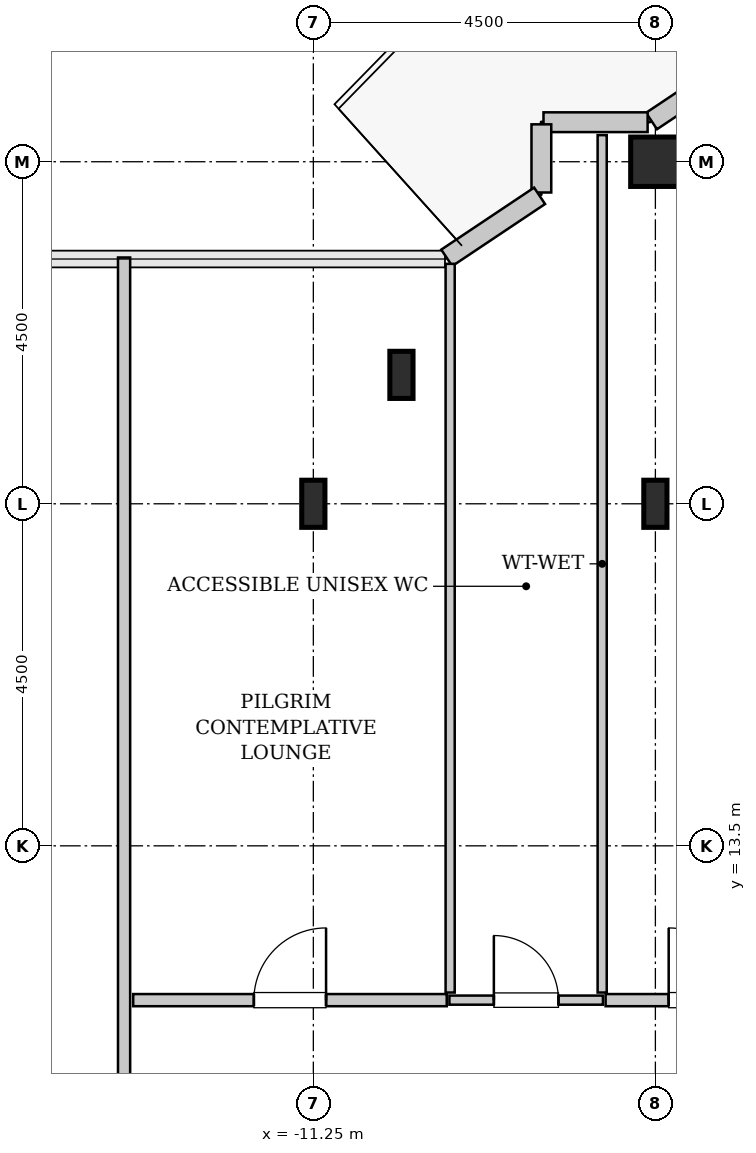
"""IFC4 building model, lengths in metres.
Left out: names, types, materials, properties, quantities, classifications, styles, units other than length and angle.
Written with IfcOpenShell. Run it as: python <this file> out.ifc"""

import sys

from ifc_helpers import new_model, si_unit, direction, frame, frame_2d, origin, origin_2d, place, context, subcontext, project, spatial, rectangle, hollow_rectangle, i_section, extrude, source, transform, mapped, element, fill, save


model = new_model("IFC4")
c1 = context("Model", 3, precision=1e-05, world=origin(), true_north=direction((0.0, 1.0)))
c2 = subcontext(c1, "Body", "Model", "MODEL_VIEW")
j1 = project(units=[si_unit("LENGTHUNIT", "METRE"), si_unit("PLANEANGLEUNIT", "RADIAN")], contexts=[c1])
p1 = place(None, origin())
s1 = spatial("IfcSite", under=j1, at=p1, CompositionType="ELEMENT")
p2 = place(p1, origin())
s2 = spatial("IfcBuilding", under=s1, at=p2, CompositionType="ELEMENT")
p3 = place(p2, frame((0.0, 0.0, 279.8)))
s3 = spatial("IfcBuildingStorey", under=s2, at=p3, CompositionType="ELEMENT", Elevation=279.8)
m1 = source(origin(), c2, "Body", "SweptSolid", [
    extrude(i_section(OverallWidth=0.305, OverallDepth=0.62, WebThickness=0.021, FlangeThickness=0.04, FilletRadius=0.027, at=origin_2d()), origin(), (0.0, 0.0, 1.0), 3.8),
])
for number, where, z_axis, x_axis in (
    (1, (-11.25, 18.0, 0.0), (0.0, 0.0, 1.0), (1.0, 0.0, 0.0)),
    (2, (-10.091, 19.696, 0.0), (0.0, 0.0, 1.0), (1.0, 0.0, 0.0)),
    (3, (-6.75, 18.0, 0.0), (0.0, 0.0, 1.0), (1.0, 0.0, 0.0)),
):
    element("IfcColumn", number, at=place(p3, frame(where, z_axis=z_axis, x_axis=x_axis)), inside=s3, PredefinedType="COLUMN", context=c2, shape_type="MappedRepresentation", body=[
        mapped(m1, transform((0.0, 0.0, 0.0), x_axis=(1.0, 0.0, 0.0), y_axis=(0.0, 1.0, 0.0), z_axis=(0.0, 0.0, 1.0), scale=1.0)),
    ])
m2 = source(origin(), c2, "Body", "SweptSolid", [
    extrude(hollow_rectangle(XDim=0.65, YDim=0.65, WallThickness=0.032, InnerFilletRadius=0.032, OuterFilletRadius=0.064, at=origin_2d()), origin(), (0.0, 0.0, 1.0), 3.8),
])
p4 = place(p3, frame((-6.75, 22.5, 0.0), z_axis=(0.0, 0.0, 1.0), x_axis=(1.0, 0.0, 0.0)))
e4 = element("IfcColumn", 4, at=p4, inside=s3, PredefinedType="COLUMN", context=c2, shape_type="MappedRepresentation", body=[
    mapped(m2, transform((0.0, 0.0, 0.0), x_axis=(1.0, 0.0, 0.0), y_axis=(0.0, 1.0, 0.0), z_axis=(0.0, 0.0, 1.0), scale=1.0)),
])
m3 = source(origin(), c2, "Body", "SweptSolid", [
    extrude(rectangle(XDim=0.565, YDim=0.26, at=frame_2d((0.283, 0.0))), origin(), (0.0, 0.0, 1.0), 3.55),
])
p5 = place(p3, frame((-6.331, 23.35, 0.0), z_axis=(0.0, 0.0, 1.0), x_axis=(-0.831651492666, -0.555297933317, 0.0)))
e5 = element("IfcWall", 5, at=p5, inside=s3, PredefinedType="SOLIDWALL", context=c2, shape_type="MappedRepresentation", body=[
    mapped(m3, transform((0.0, 0.0, 0.0), x_axis=(1.0, 0.0, 0.0), y_axis=(0.0, 1.0, 0.0), z_axis=(0.0, 0.0, 1.0), scale=1.0)),
])
m4 = source(origin(), c2, "Body", "SweptSolid", [
    extrude(rectangle(XDim=1.37, YDim=0.26, at=frame_2d((0.685, 0.0))), origin(), (0.0, 0.0, 1.0), 3.55),
])
p6 = place(p3, frame((-6.852, 23.02, 0.0), z_axis=(0.0, 0.0, 1.0), x_axis=(-1.0, 0.0, 0.0)))
e6 = element("IfcWall", 6, at=p6, inside=s3, PredefinedType="SOLIDWALL", context=c2, shape_type="MappedRepresentation", body=[
    mapped(m4, transform((0.0, 0.0, 0.0), x_axis=(1.0, 0.0, 0.0), y_axis=(0.0, 1.0, 0.0), z_axis=(0.0, 0.0, 1.0), scale=1.0)),
])
m5 = source(origin(), c2, "Body", "SweptSolid", [
    extrude(rectangle(XDim=0.897, YDim=0.26, at=frame_2d((0.448, 0.0))), origin(), (0.0, 0.0, 1.0), 3.55),
])
p7 = place(p3, frame((-8.25, 22.992, 0.0), z_axis=(0.0, 0.0, 1.0), x_axis=(0.0, -1.0, 0.0)))
e7 = element("IfcWall", 7, at=p7, inside=s3, PredefinedType="SOLIDWALL", context=c2, shape_type="MappedRepresentation", body=[
    mapped(m5, transform((0.0, 0.0, 0.0), x_axis=(1.0, 0.0, 0.0), y_axis=(0.0, 1.0, 0.0), z_axis=(0.0, 0.0, 1.0), scale=1.0)),
])
m6 = source(origin(), c2, "Body", "SweptSolid", [
    extrude(rectangle(XDim=1.469, YDim=0.26, at=frame_2d((0.734, 0.0))), origin(), (0.0, 0.0, 1.0), 3.55),
])
p8 = place(p3, frame((-8.273, 22.052, 0.0), z_axis=(0.0, 0.0, 1.0), x_axis=(-0.831461760506, -0.555581983884, 0.0)))
e8 = element("IfcWall", 8, at=p8, inside=s3, PredefinedType="SOLIDWALL", context=c2, shape_type="MappedRepresentation", body=[
    mapped(m6, transform((0.0, 0.0, 0.0), x_axis=(1.0, 0.0, 0.0), y_axis=(0.0, 1.0, 0.0), z_axis=(0.0, 0.0, 1.0), scale=1.0)),
])
m7 = source(origin(), c2, "Body", "SweptSolid", [
    extrude(rectangle(XDim=2.02, YDim=0.12, at=frame_2d((1.01, 0.0))), origin(), (0.0, 0.0, 1.0), 3.535),
])
p9 = place(p3, frame((-9.46, 11.47, 0.0), z_axis=(0.0, 0.0, 1.0), x_axis=(1.0, 0.0, 0.0)))
e9 = element("IfcWall", 9, at=p9, inside=s3, PredefinedType="PLUMBINGWALL", context=c2, shape_type="MappedRepresentation", body=[
    mapped(m7, transform((0.0, 0.0, 0.0), x_axis=(1.0, 0.0, 0.0), y_axis=(0.0, 1.0, 0.0), z_axis=(0.0, 0.0, 1.0), scale=1.0)),
])
p10 = place(p9, frame((0.585, 0.0, 0.0)))
e10 = element("IfcOpeningElement", 10, at=p10, cuts=e9, PredefinedType="OPENING", context=c2, shape_type="SweptSolid", body=[
    extrude(rectangle(XDim=0.85, YDim=2.1, at=frame_2d((0.425, 1.05))), frame((0.0, 0.07, 0.0), z_axis=(0.0, -1.0, 0.0), x_axis=(1.0, 0.0, 0.0)), (0.0, 0.0, 1.0), 0.14),
])
m8 = source(origin(), c2, "Body", "SweptSolid", [
    extrude(rectangle(XDim=11.28, YDim=0.12, at=frame_2d((5.64, 0.0))), origin(), (0.0, 0.0, 1.0), 3.535),
])
p11 = place(p3, frame((-7.45, 11.57, 0.0), z_axis=(0.0, 0.0, 1.0), x_axis=(0.0, 1.0, 0.0)))
e11 = element("IfcWall", 11, at=p11, inside=s3, PredefinedType="PLUMBINGWALL", context=c2, shape_type="MappedRepresentation", body=[
    mapped(m8, transform((0.0, 0.0, 0.0), x_axis=(1.0, 0.0, 0.0), y_axis=(0.0, 1.0, 0.0), z_axis=(0.0, 0.0, 1.0), scale=1.0)),
])
m9 = source(origin(), c2, "Body", "SweptSolid", [
    extrude(rectangle(XDim=9.587, YDim=0.12, at=frame_2d((4.793, 0.0))), origin(), (0.0, 0.0, 1.0), 3.535),
])
p12 = place(p3, frame((-9.45, 11.57, 0.0), z_axis=(0.0, 0.0, 1.0), x_axis=(0.0, 1.0, 0.0)))
e12 = element("IfcWall", 12, at=p12, inside=s3, PredefinedType="PLUMBINGWALL", context=c2, shape_type="MappedRepresentation", body=[
    mapped(m9, transform((0.0, 0.0, 0.0), x_axis=(1.0, 0.0, 0.0), y_axis=(0.0, 1.0, 0.0), z_axis=(0.0, 0.0, 1.0), scale=1.0)),
])
m10 = source(origin(), c2, "Body", "SweptSolid", [
    extrude(rectangle(XDim=12.845, YDim=0.16, at=frame_2d((6.422, 0.0))), origin(), (0.0, 0.0, 1.0), 3.535),
])
p13 = place(p3, frame((-13.74, 8.395, 0.0), z_axis=(0.0, 0.0, 1.0), x_axis=(0.0, 1.0, 0.0)))
e13 = element("IfcWall", 13, at=p13, inside=s3, PredefinedType="PARTITIONING", context=c2, shape_type="MappedRepresentation", body=[
    mapped(m10, transform((0.0, 0.0, 0.0), x_axis=(1.0, 0.0, 0.0), y_axis=(0.0, 1.0, 0.0), z_axis=(0.0, 0.0, 1.0), scale=1.0)),
])
p14 = place(p13, frame((1.083, 0.0, 0.0)))
e14 = element("IfcOpeningElement", 14, at=p14, cuts=e13, PredefinedType="OPENING", context=c2, shape_type="SweptSolid", body=[
    extrude(rectangle(XDim=0.95, YDim=2.1, at=frame_2d((0.475, 1.05))), frame((0.0, 0.09, 0.0), z_axis=(0.0, -1.0, 0.0), x_axis=(1.0, 0.0, 0.0)), (0.0, 0.0, 1.0), 0.18),
])
m11 = source(origin(), c2, "Body", "SweptSolid", [
    extrude(rectangle(XDim=4.125, YDim=0.16, at=frame_2d((2.062, 0.0))), origin(), (0.0, 0.0, 1.0), 3.535),
])
p15 = place(p3, frame((-13.62, 11.47, 0.0), z_axis=(0.0, 0.0, 1.0), x_axis=(1.0, 0.0, 0.0)))
e15 = element("IfcWall", 15, at=p15, inside=s3, PredefinedType="PARTITIONING", context=c2, shape_type="MappedRepresentation", body=[
    mapped(m11, transform((0.0, 0.0, 0.0), x_axis=(1.0, 0.0, 0.0), y_axis=(0.0, 1.0, 0.0), z_axis=(0.0, 0.0, 1.0), scale=1.0)),
])
p16 = place(p15, frame((1.587, 0.0, 0.0)))
e16 = element("IfcOpeningElement", 16, at=p16, cuts=e15, PredefinedType="OPENING", context=c2, shape_type="SweptSolid", body=[
    extrude(rectangle(XDim=0.95, YDim=2.1, at=frame_2d((0.475, 1.05))), frame((0.0, 0.09, 0.0), z_axis=(0.0, -1.0, 0.0), x_axis=(1.0, 0.0, 0.0)), (0.0, 0.0, 1.0), 0.18),
])
m12 = source(origin(), c2, "Body", "SweptSolid", [
    extrude(rectangle(XDim=2.61, YDim=0.16, at=frame_2d((1.305, 0.0))), origin(), (0.0, 0.0, 1.0), 3.535),
])
p17 = place(p3, frame((-7.405, 11.47, 0.0), z_axis=(0.0, 0.0, 1.0), x_axis=(1.0, 0.0, 0.0)))
e17 = element("IfcWall", 17, at=p17, inside=s3, PredefinedType="PARTITIONING", context=c2, shape_type="MappedRepresentation", body=[
    mapped(m12, transform((0.0, 0.0, 0.0), x_axis=(1.0, 0.0, 0.0), y_axis=(0.0, 1.0, 0.0), z_axis=(0.0, 0.0, 1.0), scale=1.0)),
])
p18 = place(p17, frame((0.83, 0.0, 0.0)))
e18 = element("IfcOpeningElement", 18, at=p18, cuts=e17, PredefinedType="OPENING", context=c2, shape_type="SweptSolid", body=[
    extrude(rectangle(XDim=0.95, YDim=2.1, at=frame_2d((0.475, 1.05))), frame((0.0, 0.09, 0.0), z_axis=(0.0, -1.0, 0.0), x_axis=(1.0, 0.0, 0.0)), (0.0, 0.0, 1.0), 0.18),
])
m13 = source(origin(), c2, "Body", "SweptSolid", [
    extrude(rectangle(XDim=0.85, YDim=2.1, at=frame_2d((0.425, 1.05))), frame((0.0, 0.025, 0.0), z_axis=(0.0, -1.0, 0.0), x_axis=(1.0, 0.0, 0.0)), (0.0, 0.0, 1.0), 0.05),
])
p19 = place(p10, origin())
e19 = element("IfcDoor", 19, at=p19, inside=s3, OperationType="SINGLE_SWING_LEFT", PredefinedType="DOOR", context=c2, shape_type="MappedRepresentation", body=[
    mapped(m13, transform((0.0, 0.0, 0.0), x_axis=(1.0, 0.0, 0.0), y_axis=(0.0, 1.0, 0.0), z_axis=(0.0, 0.0, 1.0), scale=1.0)),
])
fill(e10, e19)
m14 = source(origin(), c2, "Body", "SweptSolid", [
    extrude(rectangle(XDim=0.95, YDim=2.1, at=frame_2d((0.475, 1.05))), frame((0.0, 0.025, 0.0), z_axis=(0.0, -1.0, 0.0), x_axis=(1.0, 0.0, 0.0)), (0.0, 0.0, 1.0), 0.05),
])
p20 = place(p16, origin())
e20 = element("IfcDoor", 20, at=p20, inside=s3, OperationType="SINGLE_SWING_RIGHT", PredefinedType="DOOR", context=c2, shape_type="MappedRepresentation", body=[
    mapped(m14, transform((0.0, 0.0, 0.0), x_axis=(1.0, 0.0, 0.0), y_axis=(0.0, 1.0, 0.0), z_axis=(0.0, 0.0, 1.0), scale=1.0)),
])
fill(e16, e20)
p21 = place(p18, origin())
e21 = element("IfcDoor", 21, at=p21, inside=s3, OperationType="SINGLE_SWING_LEFT", PredefinedType="DOOR", context=c2, shape_type="MappedRepresentation", body=[
    mapped(m14, transform((0.0, 0.0, 0.0), x_axis=(1.0, 0.0, 0.0), y_axis=(0.0, 1.0, 0.0), z_axis=(0.0, 0.0, 1.0), scale=1.0)),
])
fill(e18, e21)
save(model, sys.argv[1])
